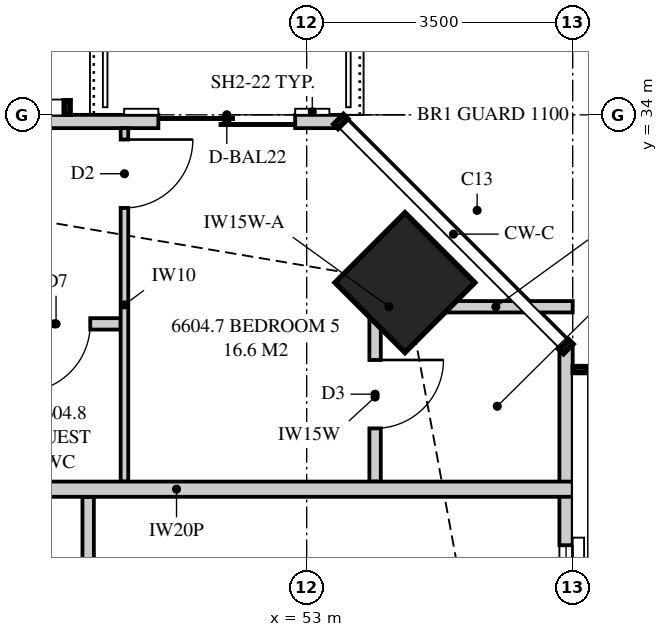
"""IFC4 building model, lengths in metres.
Left out: names, types, materials, properties, quantities, classifications, styles, units other than length and angle.
Written with IfcOpenShell. Run it as: python <this file> out.ifc"""

import sys

from ifc_helpers import new_model, si_unit, direction, frame, frame_2d, origin, origin_2d, place, context, subcontext, project, spatial, polyline, rectangle, outline, extrude, element, fill, save


model = new_model("IFC4")
c1 = context("Model", 3, precision=1e-05, world=origin(), true_north=direction((0.0, 1.0)))
c2 = subcontext(c1, "Body", "Model", "MODEL_VIEW")
j1 = project(units=[si_unit("LENGTHUNIT", "METRE"), si_unit("PLANEANGLEUNIT", "RADIAN")], contexts=[c1])
p1 = place(None, origin())
s1 = spatial("IfcSite", under=j1, at=p1, CompositionType="ELEMENT")
p2 = place(p1, origin())
s2 = spatial("IfcBuilding", under=s1, at=p2, CompositionType="ELEMENT")
p3 = place(p2, frame((0.0, 0.0, 242.45)))
s3 = spatial("IfcBuildingStorey", under=s2, at=p3, CompositionType="ELEMENT", Elevation=242.45)
p4 = place(p3, frame((54.293, 31.793, 0.0), z_axis=(0.0, 0.0, 1.0), x_axis=(0.707106781187, 0.707106781187, 0.0)))
e1 = element("IfcColumn", 1, at=p4, inside=s3, PredefinedType="COLUMN", context=c2, shape_type="SweptSolid", body=[
    extrude(rectangle(XDim=1.3, YDim=1.3, at=origin_2d()), origin(), (0.0, 0.0, 1.0), 3.5),
])
p5 = place(p3, frame((56.413, 20.55, 0.0), z_axis=(0.0, 0.0, 1.0), x_axis=(0.0, 1.0, 0.0)))
e2 = element("IfcWall", 2, at=p5, inside=s3, PredefinedType="SOLIDWALL", context=c2, shape_type="SweptSolid", body=[
    extrude(outline(polyline([(0.0, 0.0), (10.399, 0.0), (10.399, 3.26), (4.658, 3.26), (4.658, 2.3), (4.594, 2.3), (4.594, 3.26), (4.45, 3.26), (4.45, 2.3), (0.0, 2.3), (0.0, 0.0)])), frame((0.0, 0.087, 0.0), z_axis=(0.0, -1.0, 0.0), x_axis=(1.0, 0.0, 0.0)), (0.0, 0.0, 1.0), 0.175),
])
p6 = place(p5, frame((1.2, 0.0, 0.4)))
e3 = element("IfcOpeningElement", 3, at=p6, cuts=e2, PredefinedType="OPENING", context=c2, shape_type="SweptSolid", body=[
    extrude(rectangle(XDim=2.4, YDim=1.85, at=frame_2d((1.2, 0.925))), frame((0.0, 0.097, 0.0), z_axis=(0.0, -1.0, 0.0), x_axis=(1.0, 0.0, 0.0)), (0.0, 0.0, 1.0), 0.195),
])
p7 = place(p5, frame((5.988, 0.0, 0.4)))
e4 = element("IfcOpeningElement", 4, at=p7, cuts=e2, PredefinedType="OPENING", context=c2, shape_type="SweptSolid", body=[
    extrude(rectangle(XDim=1.8, YDim=1.85, at=frame_2d((0.9, 0.925))), frame((0.0, 0.097, 0.0), z_axis=(0.0, -1.0, 0.0), x_axis=(1.0, 0.0, 0.0)), (0.0, 0.0, 1.0), 0.195),
])
p8 = place(p3, frame((53.449, 33.913, 0.0), z_axis=(0.0, 0.0, 1.0), x_axis=(-1.0, 0.0, 0.0)))
e5 = element("IfcWall", 5, at=p8, inside=s3, PredefinedType="SOLIDWALL", context=c2, shape_type="SweptSolid", body=[
    extrude(outline(polyline([(0.0, 0.0), (33.597, 0.0), (33.597, 3.26), (26.039, 3.26), (26.039, 2.3), (25.955, 2.3), (25.955, 3.26), (25.824, 3.26), (25.824, 2.3), (6.574, 2.3), (6.574, 3.26), (6.442, 3.26), (6.442, 2.3), (6.359, 2.3), (6.359, 3.26), (0.0, 3.26), (0.0, 0.0)])), frame((0.0, 0.087, 0.0), z_axis=(0.0, -1.0, 0.0), x_axis=(1.0, 0.0, 0.0)), (0.0, 0.0, 1.0), 0.175),
])
p9 = place(p8, frame((0.6, 0.0, 0.0)))
e6 = element("IfcOpeningElement", 6, at=p9, cuts=e5, PredefinedType="OPENING", context=c2, shape_type="SweptSolid", body=[
    extrude(rectangle(XDim=1.8, YDim=2.25, at=frame_2d((0.9, 1.125))), frame((0.0, 0.097, 0.0), z_axis=(0.0, -1.0, 0.0), x_axis=(1.0, 0.0, 0.0)), (0.0, 0.0, 1.0), 0.195),
])
p10 = place(p8, frame((9.76, 0.0, 0.4)))
e7 = element("IfcOpeningElement", 7, at=p10, cuts=e5, PredefinedType="OPENING", context=c2, shape_type="SweptSolid", body=[
    extrude(rectangle(XDim=2.4, YDim=1.85, at=frame_2d((1.2, 0.925))), frame((0.0, 0.097, 0.0), z_axis=(0.0, -1.0, 0.0), x_axis=(1.0, 0.0, 0.0)), (0.0, 0.0, 1.0), 0.195),
])
p11 = place(p8, frame((19.974, 0.0, 0.4)))
e8 = element("IfcOpeningElement", 8, at=p11, cuts=e5, PredefinedType="OPENING", context=c2, shape_type="SweptSolid", body=[
    extrude(rectangle(XDim=1.8, YDim=1.85, at=frame_2d((0.9, 0.925))), frame((0.0, 0.097, 0.0), z_axis=(0.0, -1.0, 0.0), x_axis=(1.0, 0.0, 0.0)), (0.0, 0.0, 1.0), 0.195),
])
p12 = place(p8, frame((23.144, 0.0, 0.4)))
e9 = element("IfcOpeningElement", 9, at=p12, cuts=e5, PredefinedType="OPENING", context=c2, shape_type="SweptSolid", body=[
    extrude(rectangle(XDim=1.8, YDim=1.85, at=frame_2d((0.9, 0.925))), frame((0.0, 0.097, 0.0), z_axis=(0.0, -1.0, 0.0), x_axis=(1.0, 0.0, 0.0)), (0.0, 0.0, 1.0), 0.195),
])
p13 = place(p8, frame((29.273, 0.0, 0.4)))
e10 = element("IfcOpeningElement", 10, at=p13, cuts=e5, PredefinedType="OPENING", context=c2, shape_type="SweptSolid", body=[
    extrude(rectangle(XDim=1.8, YDim=1.85, at=frame_2d((0.9, 0.925))), frame((0.0, 0.097, 0.0), z_axis=(0.0, -1.0, 0.0), x_axis=(1.0, 0.0, 0.0)), (0.0, 0.0, 1.0), 0.195),
])
p14 = place(p3, frame((53.975, 31.475, 0.0), z_axis=(0.0, 0.0, 1.0), x_axis=(1.0, 0.0, 0.0)))
e11 = element("IfcWall", 11, at=p14, inside=s3, PredefinedType="PLUMBINGWALL", context=c2, shape_type="SweptSolid", body=[
    extrude(rectangle(XDim=0.217, YDim=0.15, at=frame_2d((0.108, 0.0))), origin(), (0.0, 0.0, 1.0), 2.3),
])
p15 = place(p3, frame((54.478, 31.475, 0.0), z_axis=(0.0, 0.0, 1.0), x_axis=(1.0, 0.0, 0.0)))
e12 = element("IfcWall", 12, at=p15, inside=s3, PredefinedType="PLUMBINGWALL", context=c2, shape_type="SweptSolid", body=[
    extrude(outline(polyline([(0.774, 3.26), (0.774, 2.3), (0.325, 2.3), (0.0, 1.15), (0.325, 0.0), (2.022, 0.0), (2.022, 3.26), (0.774, 3.26)])), frame((0.0, 0.075, 0.0), z_axis=(0.0, -1.0, 0.0), x_axis=(1.0, 0.0, 0.0)), (0.0, 0.0, 1.0), 0.15),
])
p16 = place(p3, frame((53.9, 31.4, 0.0), z_axis=(0.0, 0.0, 1.0), x_axis=(0.0, -1.0, 0.0)))
e13 = element("IfcWall", 13, at=p16, inside=s3, PredefinedType="PLUMBINGWALL", context=c2, shape_type="SweptSolid", body=[
    extrude(outline(polyline([(0.0, 0.0), (2.225, 0.0), (2.225, 3.26), (2.225, 2.3), (0.438, 2.3), (0.0, 2.3), (0.0, 3.26), (0.0, 0.0)])), frame((0.0, 0.075, 0.0), z_axis=(0.0, -1.0, 0.0), x_axis=(1.0, 0.0, 0.0)), (0.0, 0.0, 1.0), 0.15),
])
p17 = place(p16, frame((0.625, 0.0, 0.0)))
e14 = element("IfcOpeningElement", 14, at=p17, cuts=e13, PredefinedType="OPENING", context=c2, shape_type="SweptSolid", body=[
    extrude(rectangle(XDim=0.9, YDim=2.1, at=frame_2d((0.45, 1.05))), frame((0.0, 0.085, 0.0), z_axis=(0.0, -1.0, 0.0), x_axis=(1.0, 0.0, 0.0)), (0.0, 0.0, 1.0), 0.17),
])
p18 = place(p3, frame((50.603, 33.825, 0.0), z_axis=(0.0, 0.0, 1.0), x_axis=(0.0, -1.0, 0.0)))
e15 = element("IfcWall", 15, at=p18, inside=s3, PredefinedType="PARTITIONING", context=c2, shape_type="SweptSolid", body=[
    extrude(outline(polyline([(0.0, 0.0), (4.65, 0.0), (4.65, 3.26), (2.279, 3.26), (2.279, 2.3), (0.534, 2.3), (0.534, 3.26), (0.0, 3.26), (0.0, 0.0)])), frame((0.0, 0.05, 0.0), z_axis=(0.0, -1.0, 0.0), x_axis=(1.0, 0.0, 0.0)), (0.0, 0.0, 1.0), 0.1),
])
p19 = place(p18, frame((0.15, 0.0, 0.0)))
e16 = element("IfcOpeningElement", 16, at=p19, cuts=e15, PredefinedType="OPENING", context=c2, shape_type="SweptSolid", body=[
    extrude(rectangle(XDim=0.9, YDim=2.1, at=frame_2d((0.45, 1.05))), frame((0.0, 0.06, 0.0), z_axis=(0.0, -1.0, 0.0), x_axis=(1.0, 0.0, 0.0)), (0.0, 0.0, 1.0), 0.12),
])
p20 = place(p3, frame((46.075, 29.075, 0.0), z_axis=(0.0, 0.0, 1.0), x_axis=(1.0, 0.0, 0.0)))
e17 = element("IfcWall", 17, at=p20, inside=s3, PredefinedType="PARTITIONING", context=c2, shape_type="SweptSolid", body=[
    extrude(outline(polyline([(0.0, 0.0), (10.425, 0.0), (10.425, 3.26), (9.646, 3.26), (9.646, 2.3), (7.795, 2.3), (7.795, 3.26), (2.11, 3.26), (2.11, 2.66), (0.0, 2.66), (0.0, 3.26), (0.0, 0.0)])), frame((0.0, 0.1, 0.0), z_axis=(0.0, -1.0, 0.0), x_axis=(1.0, 0.0, 0.0)), (0.0, 0.0, 1.0), 0.2),
])
p21 = place(p3, frame((50.125, 25.85, 0.0), z_axis=(0.0, 0.0, 1.0), x_axis=(0.0, 1.0, 0.0)))
e18 = element("IfcWall", 18, at=p21, inside=s3, PredefinedType="PLUMBINGWALL", context=c2, shape_type="SweptSolid", body=[
    extrude(outline(polyline([(0.0, 0.0), (3.125, 0.0), (3.125, 3.26), (0.435, 3.26), (0.435, 2.66), (0.0, 2.66), (0.0, 3.26), (0.0, 0.0)])), frame((0.0, 0.075, 0.0), z_axis=(0.0, -1.0, 0.0), x_axis=(1.0, 0.0, 0.0)), (0.0, 0.0, 1.0), 0.15),
])
p22 = place(p21, frame((0.4, 0.0, 0.0)))
e19 = element("IfcOpeningElement", 19, at=p22, cuts=e18, PredefinedType="OPENING", context=c2, shape_type="SweptSolid", body=[
    extrude(rectangle(XDim=0.9, YDim=2.1, at=frame_2d((0.45, 1.05))), frame((0.0, 0.085, 0.0), z_axis=(0.0, -1.0, 0.0), x_axis=(1.0, 0.0, 0.0)), (0.0, 0.0, 1.0), 0.17),
])
p23 = place(p3, frame((50.552, 31.25, 0.0), z_axis=(0.0, 0.0, 1.0), x_axis=(-1.0, 0.0, 0.0)))
e20 = element("IfcWall", 20, at=p23, inside=s3, PredefinedType="PLUMBINGWALL", context=c2, shape_type="SweptSolid", body=[
    extrude(rectangle(XDim=1.75, YDim=0.15, at=frame_2d((0.875, 0.0))), origin(), (0.0, 0.0, 1.0), 3.26),
])
p24 = place(p23, frame((0.4, 0.0, 0.0)))
e21 = element("IfcOpeningElement", 21, at=p24, cuts=e20, PredefinedType="OPENING", context=c2, shape_type="SweptSolid", body=[
    extrude(rectangle(XDim=0.9, YDim=2.1, at=frame_2d((0.45, 1.05))), frame((0.0, 0.085, 0.0), z_axis=(0.0, -1.0, 0.0), x_axis=(1.0, 0.0, 0.0)), (0.0, 0.0, 1.0), 0.17),
])
p25 = place(p7, origin())
e22 = element("IfcWindow", 22, at=p25, inside=s3, PartitioningType="SINGLE_PANEL", PredefinedType="WINDOW", context=c2, shape_type="SweptSolid", body=[
    extrude(rectangle(XDim=1.8, YDim=1.85, at=frame_2d((0.9, 0.925))), frame((0.0, 0.03, 0.0), z_axis=(0.0, -1.0, 0.0), x_axis=(1.0, 0.0, 0.0)), (0.0, 0.0, 1.0), 0.06),
])
fill(e4, e22)
p26 = place(p9, origin())
e23 = element("IfcDoor", 23, at=p26, inside=s3, OperationType="SLIDING_TO_LEFT", PredefinedType="DOOR", context=c2, shape_type="SweptSolid", body=[
    extrude(rectangle(XDim=1.8, YDim=2.25, at=frame_2d((0.9, 1.125))), frame((0.0, 0.025, 0.0), z_axis=(0.0, -1.0, 0.0), x_axis=(1.0, 0.0, 0.0)), (0.0, 0.0, 1.0), 0.05),
])
fill(e6, e23)
p27 = place(p17, origin())
e24 = element("IfcDoor", 24, at=p27, inside=s3, OperationType="SINGLE_SWING_LEFT", PredefinedType="DOOR", context=c2, shape_type="SweptSolid", body=[
    extrude(rectangle(XDim=0.9, YDim=2.1, at=frame_2d((0.45, 1.05))), frame((0.0, 0.025, 0.0), z_axis=(0.0, -1.0, 0.0), x_axis=(1.0, 0.0, 0.0)), (0.0, 0.0, 1.0), 0.05),
])
fill(e14, e24)
p28 = place(p19, origin())
e25 = element("IfcDoor", 25, at=p28, inside=s3, OperationType="SINGLE_SWING_LEFT", PredefinedType="DOOR", context=c2, shape_type="SweptSolid", body=[
    extrude(rectangle(XDim=0.9, YDim=2.1, at=frame_2d((0.45, 1.05))), frame((0.0, 0.025, 0.0), z_axis=(0.0, -1.0, 0.0), x_axis=(1.0, 0.0, 0.0)), (0.0, 0.0, 1.0), 0.05),
])
fill(e16, e25)
p29 = place(p24, origin())
e26 = element("IfcDoor", 26, at=p29, inside=s3, OperationType="SINGLE_SWING_RIGHT", PredefinedType="DOOR", context=c2, shape_type="SweptSolid", body=[
    extrude(rectangle(XDim=0.9, YDim=2.1, at=frame_2d((0.45, 1.05))), frame((0.0, 0.025, 0.0), z_axis=(0.0, -1.0, 0.0), x_axis=(1.0, 0.0, 0.0)), (0.0, 0.0, 1.0), 0.05),
])
fill(e21, e26)
save(model, sys.argv[1])
